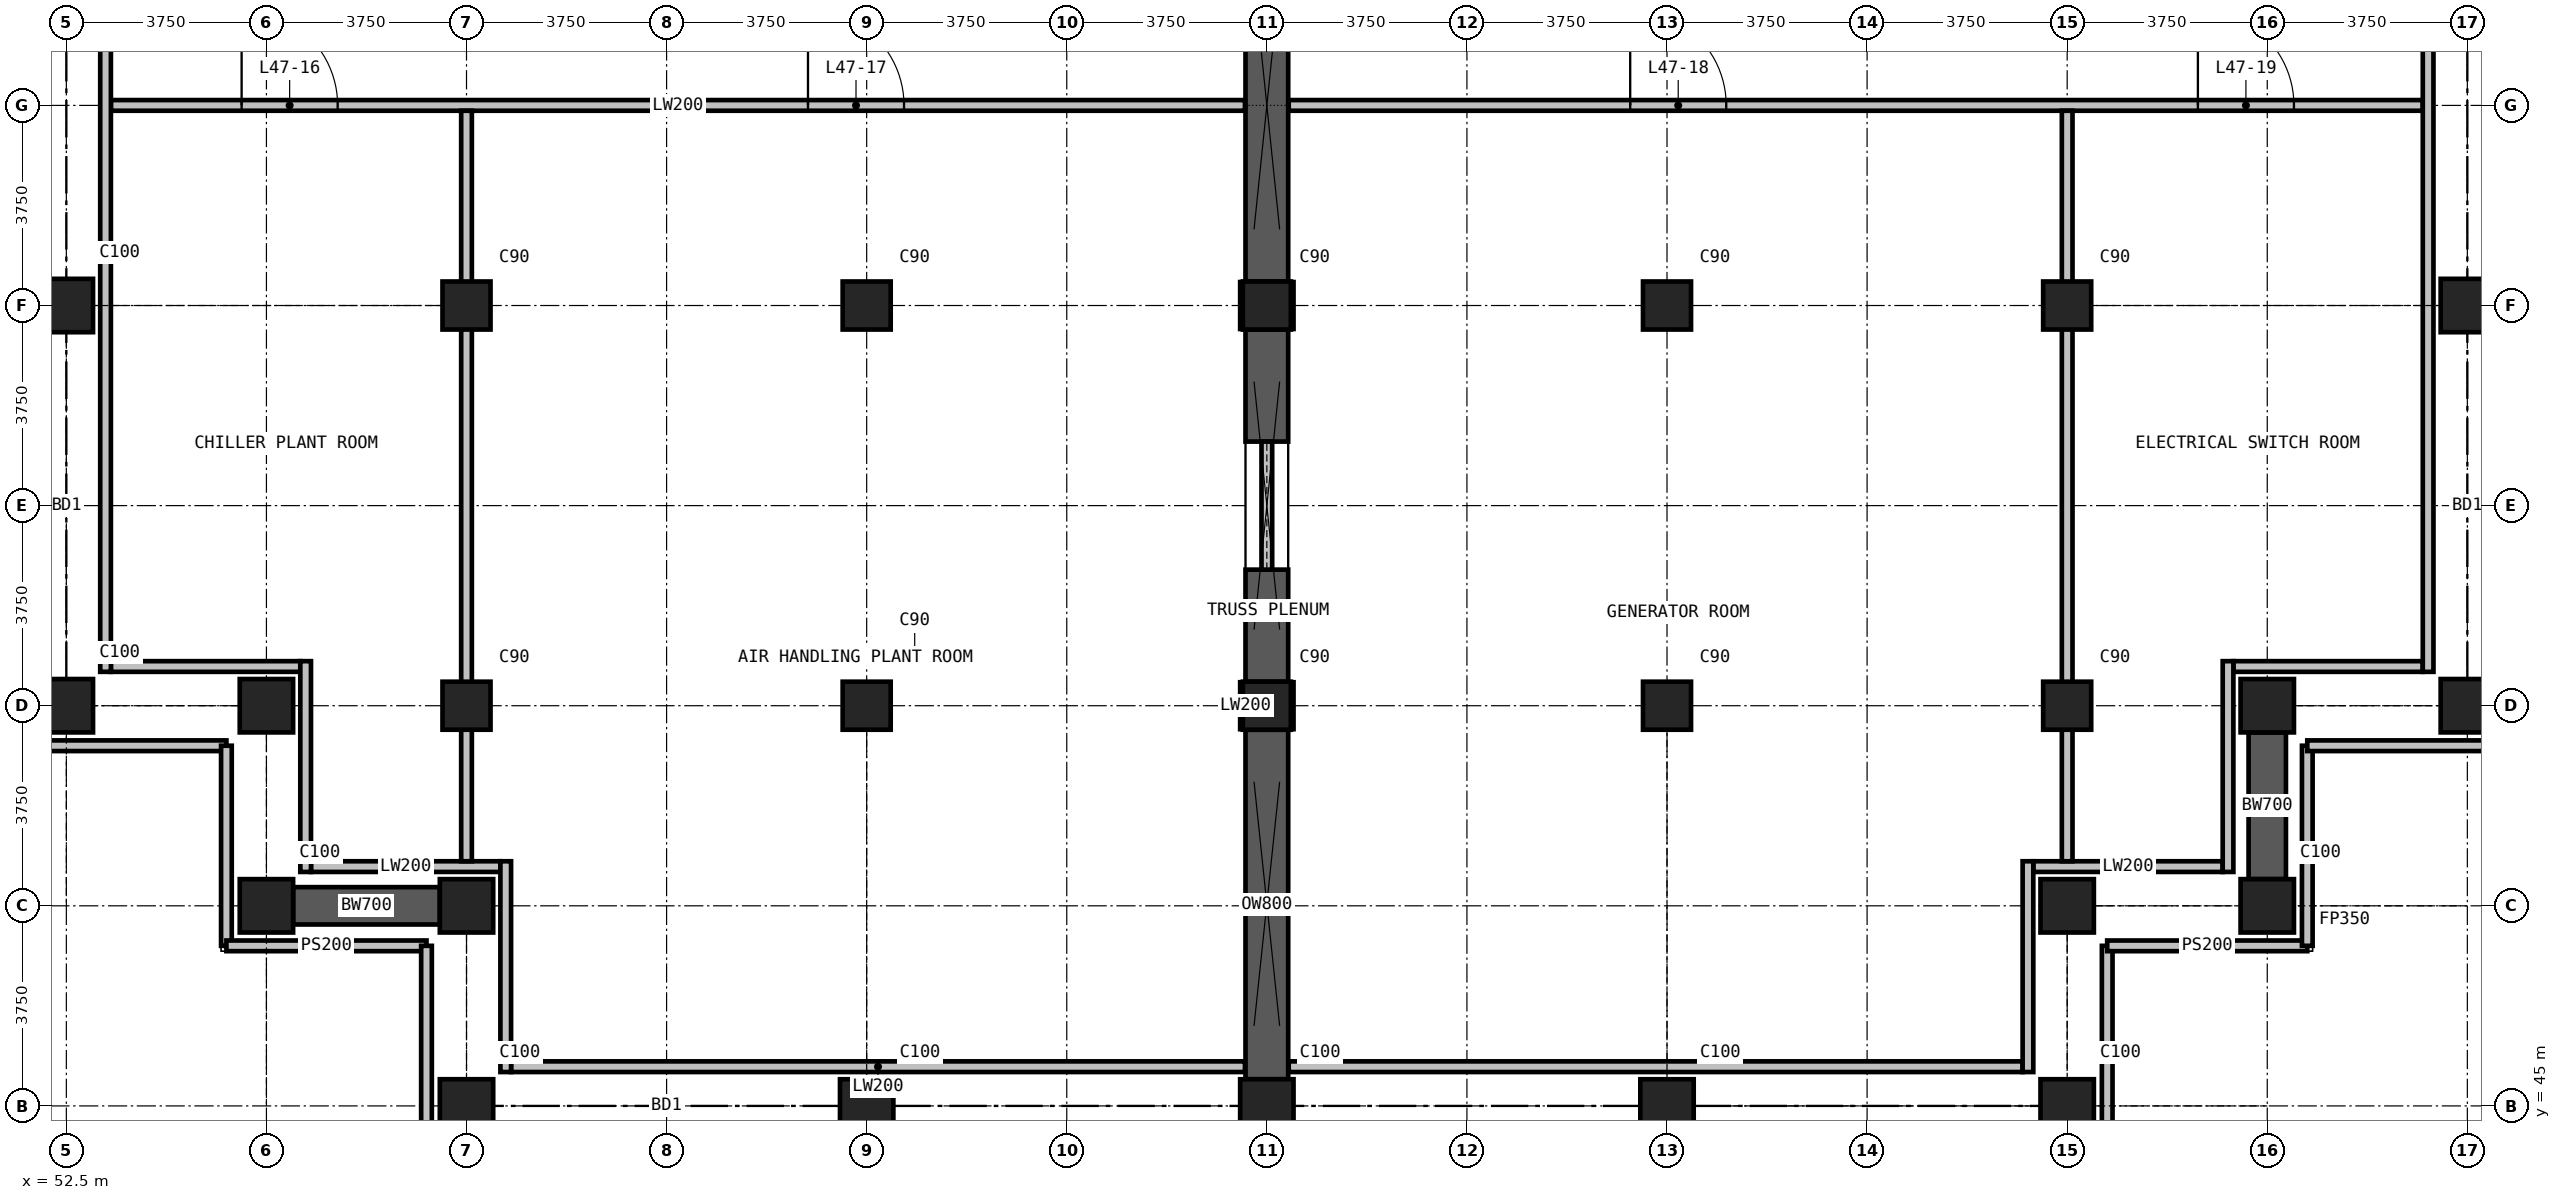
"""IFC4 building model, lengths in metres.
Left out: names, types, materials, properties, quantities, classifications, styles, units other than length and angle.
Written with IfcOpenShell. Run it as: python <this file> out.ifc"""

import sys

from ifc_helpers import new_model, si_unit, direction, frame, frame_2d, origin, origin_2d, place, context, subcontext, project, spatial, rectangle, extrude, element, fill, save


model = new_model("IFC4")
c1 = context("Model", 3, precision=1e-05, world=origin(), true_north=direction((0.0, 1.0)))
c2 = subcontext(c1, "Body", "Model", "MODEL_VIEW")
j1 = project(units=[si_unit("LENGTHUNIT", "METRE"), si_unit("PLANEANGLEUNIT", "RADIAN")], contexts=[c1])
p1 = place(None, origin())
s1 = spatial("IfcSite", under=j1, at=p1, CompositionType="ELEMENT")
p2 = place(p1, origin())
s2 = spatial("IfcBuilding", under=s1, at=p2, CompositionType="ELEMENT")
p3 = place(p2, frame((0.0, 0.0, 183.7)))
s3 = spatial("IfcBuildingStorey", under=s2, at=p3, CompositionType="ELEMENT", Elevation=183.7)
for number, where, z_axis, x_axis in (
    (1, (52.5, 52.5, 0.0), (0.0, 0.0, 1.0), (1.0, 0.0, 0.0)),
    (2, (52.5, 60.0, 0.0), (0.0, 0.0, 1.0), (1.0, 0.0, 0.0)),
    (3, (56.25, 48.75, 0.0), (0.0, 0.0, 1.0), (1.0, 0.0, 0.0)),
    (4, (56.25, 52.5, 0.0), (0.0, 0.0, 1.0), (1.0, 0.0, 0.0)),
    (5, (60.0, 45.0, 0.0), (0.0, 0.0, 1.0), (1.0, 0.0, 0.0)),
    (6, (60.0, 48.75, 0.0), (0.0, 0.0, 1.0), (1.0, 0.0, 0.0)),
):
    element("IfcColumn", number, at=place(p3, frame(where, z_axis=z_axis, x_axis=x_axis)), inside=s3, PredefinedType="COLUMN", context=c2, shape_type="SweptSolid", body=[
        extrude(rectangle(XDim=1.0, YDim=1.0, at=origin_2d()), origin(), (0.0, 0.0, 1.0), 5.0),
    ])
for number, where, z_axis, x_axis in (
    (7, (60.0, 52.5, 0.0), (0.0, 0.0, 1.0), (1.0, 0.0, 0.0)),
    (8, (60.0, 60.0, 0.0), (0.0, 0.0, 1.0), (1.0, 0.0, 0.0)),
):
    element("IfcColumn", number, at=place(p3, frame(where, z_axis=z_axis, x_axis=x_axis)), inside=s3, PredefinedType="COLUMN", context=c2, shape_type="SweptSolid", body=[
        extrude(rectangle(XDim=0.9, YDim=0.9, at=origin_2d()), origin(), (0.0, 0.0, 1.0), 5.0),
    ])
p4 = place(p3, frame((67.5, 45.0, 0.0), z_axis=(0.0, 0.0, 1.0), x_axis=(1.0, 0.0, 0.0)))
e9 = element("IfcColumn", 9, at=p4, inside=s3, PredefinedType="COLUMN", context=c2, shape_type="SweptSolid", body=[
    extrude(rectangle(XDim=1.0, YDim=1.0, at=origin_2d()), origin(), (0.0, 0.0, 1.0), 5.0),
])
for number, where, z_axis, x_axis in (
    (10, (67.5, 52.5, 0.0), (0.0, 0.0, 1.0), (1.0, 0.0, 0.0)),
    (11, (67.5, 60.0, 0.0), (0.0, 0.0, 1.0), (1.0, 0.0, 0.0)),
):
    element("IfcColumn", number, at=place(p3, frame(where, z_axis=z_axis, x_axis=x_axis)), inside=s3, PredefinedType="COLUMN", context=c2, shape_type="SweptSolid", body=[
        extrude(rectangle(XDim=0.9, YDim=0.9, at=origin_2d()), origin(), (0.0, 0.0, 1.0), 5.0),
    ])
p5 = place(p3, frame((75.0, 45.0, 0.0), z_axis=(0.0, 0.0, 1.0), x_axis=(1.0, 0.0, 0.0)))
e12 = element("IfcColumn", 12, at=p5, inside=s3, PredefinedType="COLUMN", context=c2, shape_type="SweptSolid", body=[
    extrude(rectangle(XDim=1.0, YDim=1.0, at=origin_2d()), origin(), (0.0, 0.0, 1.0), 5.0),
])
for number, where, z_axis, x_axis in (
    (13, (75.0, 52.5, 0.0), (0.0, 0.0, 1.0), (1.0, 0.0, 0.0)),
    (14, (75.0, 60.0, 0.0), (0.0, 0.0, 1.0), (1.0, 0.0, 0.0)),
):
    element("IfcColumn", number, at=place(p3, frame(where, z_axis=z_axis, x_axis=x_axis)), inside=s3, PredefinedType="COLUMN", context=c2, shape_type="SweptSolid", body=[
        extrude(rectangle(XDim=0.9, YDim=0.9, at=origin_2d()), origin(), (0.0, 0.0, 1.0), 5.0),
    ])
p6 = place(p3, frame((82.5, 45.0, 0.0), z_axis=(0.0, 0.0, 1.0), x_axis=(1.0, 0.0, 0.0)))
e15 = element("IfcColumn", 15, at=p6, inside=s3, PredefinedType="COLUMN", context=c2, shape_type="SweptSolid", body=[
    extrude(rectangle(XDim=1.0, YDim=1.0, at=origin_2d()), origin(), (0.0, 0.0, 1.0), 5.0),
])
for number, where, z_axis, x_axis in (
    (16, (82.5, 52.5, 0.0), (0.0, 0.0, 1.0), (1.0, 0.0, 0.0)),
    (17, (82.5, 60.0, 0.0), (0.0, 0.0, 1.0), (1.0, 0.0, 0.0)),
):
    element("IfcColumn", number, at=place(p3, frame(where, z_axis=z_axis, x_axis=x_axis)), inside=s3, PredefinedType="COLUMN", context=c2, shape_type="SweptSolid", body=[
        extrude(rectangle(XDim=0.9, YDim=0.9, at=origin_2d()), origin(), (0.0, 0.0, 1.0), 5.0),
    ])
for number, where, z_axis, x_axis in (
    (18, (90.0, 45.0, 0.0), (0.0, 0.0, 1.0), (1.0, 0.0, 0.0)),
    (19, (90.0, 48.75, 0.0), (0.0, 0.0, 1.0), (1.0, 0.0, 0.0)),
):
    element("IfcColumn", number, at=place(p3, frame(where, z_axis=z_axis, x_axis=x_axis)), inside=s3, PredefinedType="COLUMN", context=c2, shape_type="SweptSolid", body=[
        extrude(rectangle(XDim=1.0, YDim=1.0, at=origin_2d()), origin(), (0.0, 0.0, 1.0), 5.0),
    ])
for number, where, z_axis, x_axis in (
    (20, (90.0, 52.5, 0.0), (0.0, 0.0, 1.0), (1.0, 0.0, 0.0)),
    (21, (90.0, 60.0, 0.0), (0.0, 0.0, 1.0), (1.0, 0.0, 0.0)),
):
    element("IfcColumn", number, at=place(p3, frame(where, z_axis=z_axis, x_axis=x_axis)), inside=s3, PredefinedType="COLUMN", context=c2, shape_type="SweptSolid", body=[
        extrude(rectangle(XDim=0.9, YDim=0.9, at=origin_2d()), origin(), (0.0, 0.0, 1.0), 5.0),
    ])
for number, where, z_axis, x_axis in (
    (22, (93.75, 48.75, 0.0), (0.0, 0.0, 1.0), (1.0, 0.0, 0.0)),
    (23, (93.75, 52.5, 0.0), (0.0, 0.0, 1.0), (1.0, 0.0, 0.0)),
    (24, (97.5, 52.5, 0.0), (0.0, 0.0, 1.0), (1.0, 0.0, 0.0)),
    (25, (97.5, 60.0, 0.0), (0.0, 0.0, 1.0), (1.0, 0.0, 0.0)),
):
    element("IfcColumn", number, at=place(p3, frame(where, z_axis=z_axis, x_axis=x_axis)), inside=s3, PredefinedType="COLUMN", context=c2, shape_type="SweptSolid", body=[
        extrude(rectangle(XDim=1.0, YDim=1.0, at=origin_2d()), origin(), (0.0, 0.0, 1.0), 5.0),
    ])
for number, where, z_axis, x_axis in (
    (26, (93.75, 52.0, 0.0), (0.0, 0.0, 1.0), (0.0, -1.0, 0.0)),
    (27, (59.5, 48.75, 0.0), (0.0, 0.0, 1.0), (-1.0, 0.0, 0.0)),
):
    element("IfcWall", number, at=place(p3, frame(where, z_axis=z_axis, x_axis=x_axis)), inside=s3, PredefinedType="SHEAR", context=c2, shape_type="SweptSolid", body=[
        extrude(rectangle(XDim=2.75, YDim=0.7, at=frame_2d((1.375, 0.0))), origin(), (0.0, 0.0, 1.0), 4.7),
    ])
p7 = place(p3, frame((75.0, 45.5, 0.0), z_axis=(0.0, 0.0, 1.0), x_axis=(0.0, 1.0, 0.0)))
e28 = element("IfcWall", 28, at=p7, inside=s3, PredefinedType="SHEAR", context=c2, shape_type="SweptSolid", body=[
    extrude(rectangle(XDim=6.55, YDim=0.8, at=frame_2d((3.275, 0.0))), origin(), (0.0, 0.0, 1.0), 4.7),
])
for number, where, z_axis, x_axis in (
    (29, (75.0, 52.95, 0.0), (0.0, 0.0, 1.0), (0.0, 1.0, 0.0)),
    (30, (75.0, 57.45, 0.0), (0.0, 0.0, 1.0), (0.0, 1.0, 0.0)),
):
    element("IfcWall", number, at=place(p3, frame(where, z_axis=z_axis, x_axis=x_axis)), inside=s3, PredefinedType="SHEAR", context=c2, shape_type="SweptSolid", body=[
        extrude(rectangle(XDim=2.1, YDim=0.8, at=frame_2d((1.05, 0.0))), origin(), (0.0, 0.0, 1.0), 4.7),
    ])
p8 = place(p3, frame((75.0, 60.45, 0.0), z_axis=(0.0, 0.0, 1.0), x_axis=(0.0, 1.0, 0.0)))
e31 = element("IfcWall", 31, at=p8, inside=s3, PredefinedType="SHEAR", context=c2, shape_type="SweptSolid", body=[
    extrude(rectangle(XDim=6.6, YDim=0.8, at=frame_2d((3.3, 0.0))), origin(), (0.0, 0.0, 1.0), 4.7),
])
for number, where, z_axis, x_axis in (
    (32, (51.75, 51.75, 0.0), (0.0, 0.0, 1.0), (1.0, 0.0, 0.0)),
    (33, (55.5, 48.0, 0.0), (0.0, 0.0, 1.0), (0.0, 1.0, 0.0)),
    (34, (55.5, 48.0, 0.0), (0.0, 0.0, 1.0), (1.0, 0.0, 0.0)),
    (35, (59.25, 44.25, 0.0), (0.0, 0.0, 1.0), (0.0, 1.0, 0.0)),
    (36, (90.75, 44.25, 0.0), (0.0, 0.0, 1.0), (0.0, 1.0, 0.0)),
    (37, (90.75, 48.0, 0.0), (0.0, 0.0, 1.0), (1.0, 0.0, 0.0)),
    (38, (94.5, 48.0, 0.0), (0.0, 0.0, 1.0), (0.0, 1.0, 0.0)),
    (39, (94.5, 51.75, 0.0), (0.0, 0.0, 1.0), (1.0, 0.0, 0.0)),
):
    element("IfcWall", number, at=place(p3, frame(where, z_axis=z_axis, x_axis=x_axis)), inside=s3, PredefinedType="SOLIDWALL", context=c2, shape_type="SweptSolid", body=[
        extrude(rectangle(XDim=3.75, YDim=0.2, at=frame_2d((1.875, 0.0))), origin(), (0.0, 0.0, 1.0), 4.7),
    ])
for number, where, z_axis, x_axis in (
    (40, (60.835, 45.735, 0.0), (0.0, 0.0, 1.0), (1.0, 0.0, 0.0)),
    (41, (75.41, 45.735, 0.0), (0.0, 0.0, 1.0), (1.0, 0.0, 0.0)),
):
    element("IfcWall", number, at=place(p3, frame(where, z_axis=z_axis, x_axis=x_axis)), inside=s3, PredefinedType="PARTITIONING", context=c2, shape_type="SweptSolid", body=[
        extrude(rectangle(XDim=13.755, YDim=0.2, at=frame_2d((6.877, 0.0))), origin(), (0.0, 0.0, 1.0), 4.7),
    ])
for number, where, z_axis, x_axis in (
    (42, (57.085, 49.485, 0.0), (0.0, 0.0, 1.0), (1.0, 0.0, 0.0)),
    (43, (89.365, 49.485, 0.0), (0.0, 0.0, 1.0), (1.0, 0.0, 0.0)),
    (44, (53.335, 53.235, 0.0), (0.0, 0.0, 1.0), (1.0, 0.0, 0.0)),
    (45, (93.115, 53.235, 0.0), (0.0, 0.0, 1.0), (1.0, 0.0, 0.0)),
):
    element("IfcWall", number, at=place(p3, frame(where, z_axis=z_axis, x_axis=x_axis)), inside=s3, PredefinedType="PARTITIONING", context=c2, shape_type="SweptSolid", body=[
        extrude(rectangle(XDim=3.55, YDim=0.2, at=frame_2d((1.775, 0.0))), origin(), (0.0, 0.0, 1.0), 4.7),
    ])
p9 = place(p3, frame((53.335, 63.75, 0.0), z_axis=(0.0, 0.0, 1.0), x_axis=(1.0, 0.0, 0.0)))
e46 = element("IfcWall", 46, at=p9, inside=s3, PredefinedType="PARTITIONING", context=c2, shape_type="SweptSolid", body=[
    extrude(rectangle(XDim=21.255, YDim=0.2, at=frame_2d((10.627, 0.0))), origin(), (0.0, 0.0, 1.0), 4.7),
])
p10 = place(p9, frame((2.45, 0.0, 0.0)))
e47 = element("IfcOpeningElement", 47, at=p10, cuts=e46, PredefinedType="OPENING", context=c2, shape_type="SweptSolid", body=[
    extrude(rectangle(XDim=1.8, YDim=2.4, at=frame_2d((0.9, 1.2))), frame((0.0, 0.11, 0.0), z_axis=(0.0, -1.0, 0.0), x_axis=(1.0, 0.0, 0.0)), (0.0, 0.0, 1.0), 0.22),
])
p11 = place(p9, frame((13.065, 0.0, 0.0)))
e48 = element("IfcOpeningElement", 48, at=p11, cuts=e46, PredefinedType="OPENING", context=c2, shape_type="SweptSolid", body=[
    extrude(rectangle(XDim=1.8, YDim=2.4, at=frame_2d((0.9, 1.2))), frame((0.0, 0.11, 0.0), z_axis=(0.0, -1.0, 0.0), x_axis=(1.0, 0.0, 0.0)), (0.0, 0.0, 1.0), 0.22),
])
p12 = place(p3, frame((75.41, 63.75, 0.0), z_axis=(0.0, 0.0, 1.0), x_axis=(1.0, 0.0, 0.0)))
e49 = element("IfcWall", 49, at=p12, inside=s3, PredefinedType="PARTITIONING", context=c2, shape_type="SweptSolid", body=[
    extrude(rectangle(XDim=21.255, YDim=0.2, at=frame_2d((10.627, 0.0))), origin(), (0.0, 0.0, 1.0), 4.7),
])
p13 = place(p12, frame((6.4, 0.0, 0.0)))
e50 = element("IfcOpeningElement", 50, at=p13, cuts=e49, PredefinedType="OPENING", context=c2, shape_type="SweptSolid", body=[
    extrude(rectangle(XDim=1.8, YDim=2.4, at=frame_2d((0.9, 1.2))), frame((0.0, 0.11, 0.0), z_axis=(0.0, -1.0, 0.0), x_axis=(1.0, 0.0, 0.0)), (0.0, 0.0, 1.0), 0.22),
])
p14 = place(p12, frame((17.04, 0.0, 0.0)))
e51 = element("IfcOpeningElement", 51, at=p14, cuts=e49, PredefinedType="OPENING", context=c2, shape_type="SweptSolid", body=[
    extrude(rectangle(XDim=1.8, YDim=2.4, at=frame_2d((0.9, 1.2))), frame((0.0, 0.11, 0.0), z_axis=(0.0, -1.0, 0.0), x_axis=(1.0, 0.0, 0.0)), (0.0, 0.0, 1.0), 0.22),
])
p15 = place(p3, frame((53.235, 53.135, 0.0), z_axis=(0.0, 0.0, 1.0), x_axis=(0.0, 1.0, 0.0)))
e52 = element("IfcWall", 52, at=p15, inside=s3, PredefinedType="PARTITIONING", context=c2, shape_type="SweptSolid", body=[
    extrude(rectangle(XDim=28.955, YDim=0.2, at=frame_2d((14.478, 0.0))), origin(), (0.0, 0.0, 1.0), 4.7),
])
p16 = place(p3, frame((56.985, 49.385, 0.0), z_axis=(0.0, 0.0, 1.0), x_axis=(0.0, 1.0, 0.0)))
e53 = element("IfcWall", 53, at=p16, inside=s3, PredefinedType="PARTITIONING", context=c2, shape_type="SweptSolid", body=[
    extrude(rectangle(XDim=3.95, YDim=0.2, at=frame_2d((1.975, 0.0))), origin(), (0.0, 0.0, 1.0), 4.7),
])
p17 = place(p3, frame((60.0, 49.585, 0.0), z_axis=(0.0, 0.0, 1.0), x_axis=(0.0, 1.0, 0.0)))
e54 = element("IfcWall", 54, at=p17, inside=s3, PredefinedType="PARTITIONING", context=c2, shape_type="SweptSolid", body=[
    extrude(rectangle(XDim=14.065, YDim=0.2, at=frame_2d((7.032, 0.0))), origin(), (0.0, 0.0, 1.0), 4.7),
])
p18 = place(p3, frame((60.735, 45.635, 0.0), z_axis=(0.0, 0.0, 1.0), x_axis=(0.0, 1.0, 0.0)))
e55 = element("IfcWall", 55, at=p18, inside=s3, PredefinedType="PARTITIONING", context=c2, shape_type="SweptSolid", body=[
    extrude(rectangle(XDim=3.95, YDim=0.2, at=frame_2d((1.975, 0.0))), origin(), (0.0, 0.0, 1.0), 4.7),
])
for number, where, z_axis, x_axis in (
    (56, (74.6, 52.06, 0.0), (0.0, 0.0, 1.0), (0.0, 1.0, 0.0)),
    (57, (74.6, 59.56, 0.0), (0.0, 0.0, 1.0), (0.0, 1.0, 0.0)),
):
    element("IfcWall", number, at=place(p3, frame(where, z_axis=z_axis, x_axis=x_axis)), inside=s3, PredefinedType="PARTITIONING", context=c2, shape_type="SweptSolid", body=[
        extrude(rectangle(XDim=0.88, YDim=0.2, at=frame_2d((0.44, 0.0))), origin(), (0.0, 0.0, 1.0), 4.7),
    ])
p19 = place(p3, frame((75.0, 55.05, 0.0), z_axis=(0.0, 0.0, 1.0), x_axis=(0.0, 1.0, 0.0)))
e58 = element("IfcWall", 58, at=p19, inside=s3, PredefinedType="PARTITIONING", context=c2, shape_type="SweptSolid", body=[
    extrude(rectangle(XDim=2.4, YDim=0.2, at=frame_2d((1.2, 0.0))), origin(), (0.0, 0.0, 1.0), 2.4),
])
for number, where, z_axis, x_axis in (
    (59, (75.4, 52.06, 0.0), (0.0, 0.0, 1.0), (0.0, 1.0, 0.0)),
    (60, (75.4, 59.56, 0.0), (0.0, 0.0, 1.0), (0.0, 1.0, 0.0)),
):
    element("IfcWall", number, at=place(p3, frame(where, z_axis=z_axis, x_axis=x_axis)), inside=s3, PredefinedType="PARTITIONING", context=c2, shape_type="SweptSolid", body=[
        extrude(rectangle(XDim=0.88, YDim=0.2, at=frame_2d((0.44, 0.0))), origin(), (0.0, 0.0, 1.0), 4.7),
    ])
p20 = place(p3, frame((89.265, 45.635, 0.0), z_axis=(0.0, 0.0, 1.0), x_axis=(0.0, 1.0, 0.0)))
e61 = element("IfcWall", 61, at=p20, inside=s3, PredefinedType="PARTITIONING", context=c2, shape_type="SweptSolid", body=[
    extrude(rectangle(XDim=3.95, YDim=0.2, at=frame_2d((1.975, 0.0))), origin(), (0.0, 0.0, 1.0), 4.7),
])
p21 = place(p3, frame((90.0, 49.585, 0.0), z_axis=(0.0, 0.0, 1.0), x_axis=(0.0, 1.0, 0.0)))
e62 = element("IfcWall", 62, at=p21, inside=s3, PredefinedType="PARTITIONING", context=c2, shape_type="SweptSolid", body=[
    extrude(rectangle(XDim=14.065, YDim=0.2, at=frame_2d((7.032, 0.0))), origin(), (0.0, 0.0, 1.0), 4.7),
])
p22 = place(p3, frame((93.015, 49.385, 0.0), z_axis=(0.0, 0.0, 1.0), x_axis=(0.0, 1.0, 0.0)))
e63 = element("IfcWall", 63, at=p22, inside=s3, PredefinedType="PARTITIONING", context=c2, shape_type="SweptSolid", body=[
    extrude(rectangle(XDim=3.95, YDim=0.2, at=frame_2d((1.975, 0.0))), origin(), (0.0, 0.0, 1.0), 4.7),
])
p23 = place(p3, frame((96.765, 53.135, 0.0), z_axis=(0.0, 0.0, 1.0), x_axis=(0.0, 1.0, 0.0)))
e64 = element("IfcWall", 64, at=p23, inside=s3, PredefinedType="PARTITIONING", context=c2, shape_type="SweptSolid", body=[
    extrude(rectangle(XDim=28.955, YDim=0.2, at=frame_2d((14.478, 0.0))), origin(), (0.0, 0.0, 1.0), 4.7),
])
p24 = place(p10, origin())
e65 = element("IfcDoor", 65, at=p24, inside=s3, OperationType="DOUBLE_DOOR_SINGLE_SWING", PredefinedType="DOOR", context=c2, shape_type="SweptSolid", body=[
    extrude(rectangle(XDim=1.8, YDim=2.4, at=frame_2d((0.9, 1.2))), frame((0.0, 0.025, 0.0), z_axis=(0.0, -1.0, 0.0), x_axis=(1.0, 0.0, 0.0)), (0.0, 0.0, 1.0), 0.05),
])
fill(e47, e65)
p25 = place(p11, origin())
e66 = element("IfcDoor", 66, at=p25, inside=s3, OperationType="DOUBLE_DOOR_SINGLE_SWING", PredefinedType="DOOR", context=c2, shape_type="SweptSolid", body=[
    extrude(rectangle(XDim=1.8, YDim=2.4, at=frame_2d((0.9, 1.2))), frame((0.0, 0.025, 0.0), z_axis=(0.0, -1.0, 0.0), x_axis=(1.0, 0.0, 0.0)), (0.0, 0.0, 1.0), 0.05),
])
fill(e48, e66)
p26 = place(p13, origin())
e67 = element("IfcDoor", 67, at=p26, inside=s3, OperationType="DOUBLE_DOOR_SINGLE_SWING", PredefinedType="DOOR", context=c2, shape_type="SweptSolid", body=[
    extrude(rectangle(XDim=1.8, YDim=2.4, at=frame_2d((0.9, 1.2))), frame((0.0, 0.025, 0.0), z_axis=(0.0, -1.0, 0.0), x_axis=(1.0, 0.0, 0.0)), (0.0, 0.0, 1.0), 0.05),
])
fill(e50, e67)
p27 = place(p14, origin())
e68 = element("IfcDoor", 68, at=p27, inside=s3, OperationType="DOUBLE_DOOR_SINGLE_SWING", PredefinedType="DOOR", context=c2, shape_type="SweptSolid", body=[
    extrude(rectangle(XDim=1.8, YDim=2.4, at=frame_2d((0.9, 1.2))), frame((0.0, 0.025, 0.0), z_axis=(0.0, -1.0, 0.0), x_axis=(1.0, 0.0, 0.0)), (0.0, 0.0, 1.0), 0.05),
])
fill(e51, e68)
save(model, sys.argv[1])
